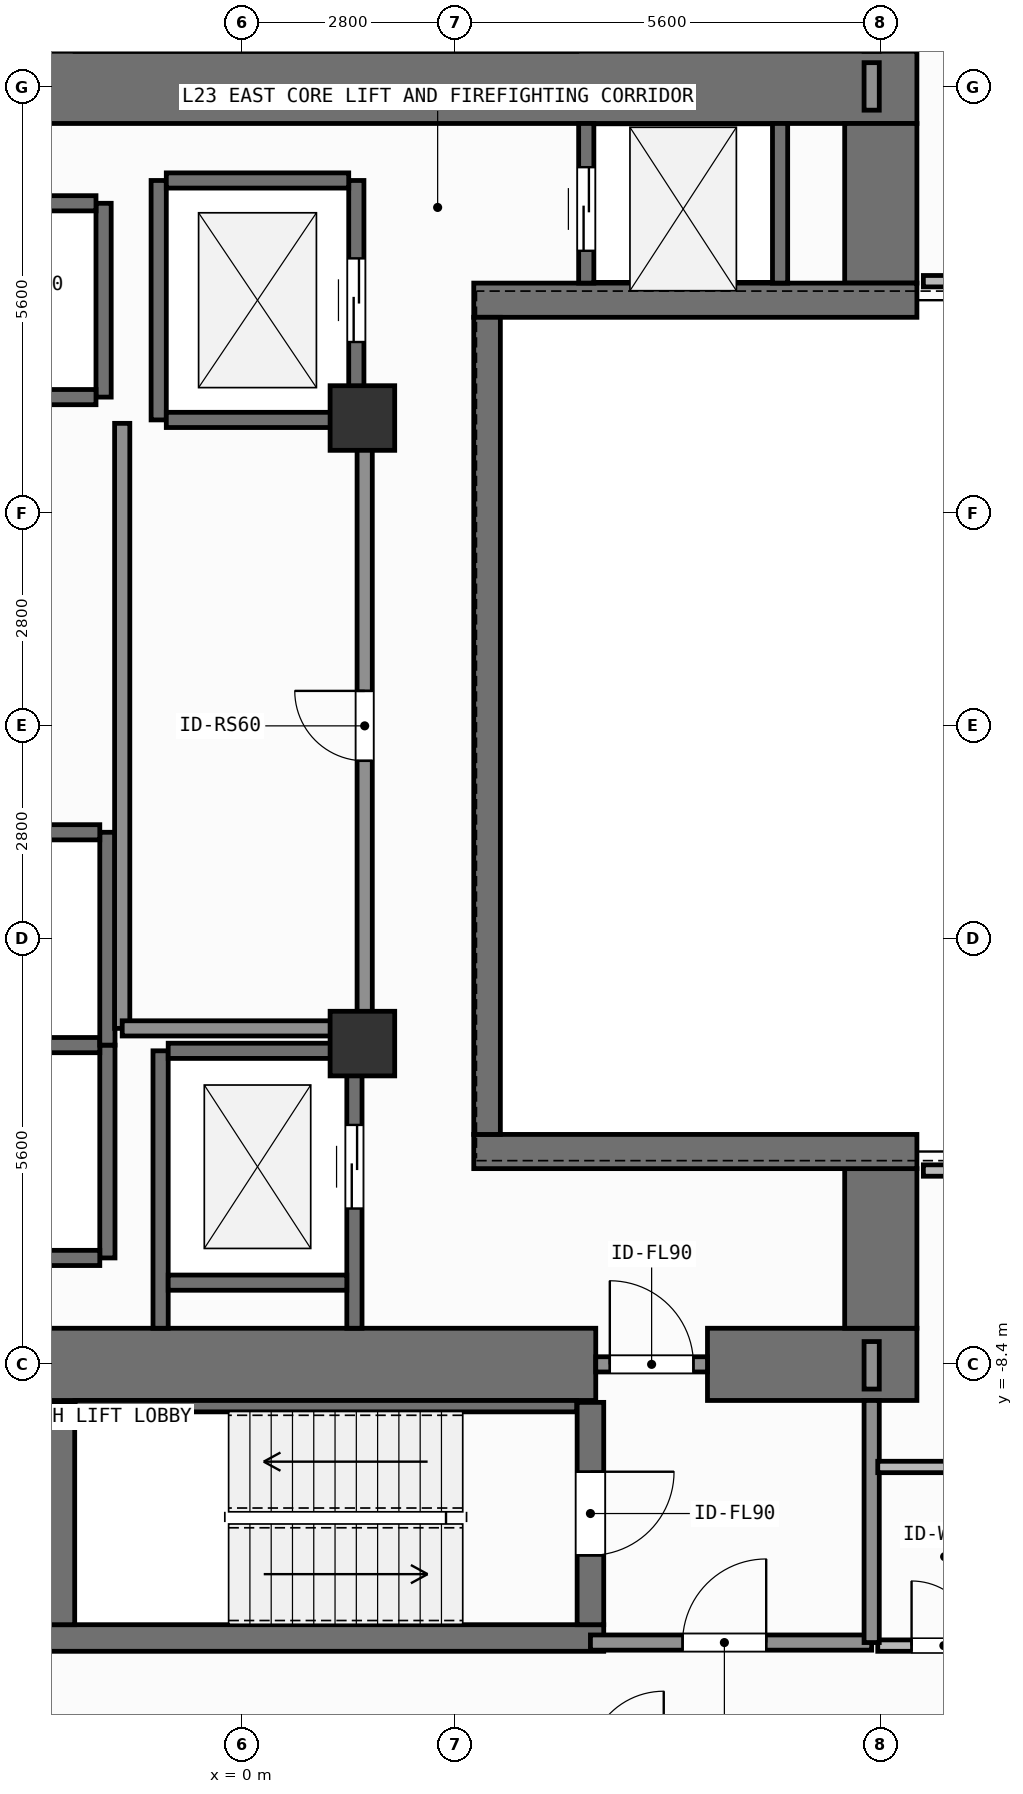
"""IFC4 building model, lengths in metres.
Left out: names, types, materials, properties, quantities, classifications, styles, units other than length and angle.
Written with IfcOpenShell. Run it as: python <this file> out.ifc"""

import sys

from ifc_helpers import new_model, si_unit, direction, frame, frame_2d, origin, origin_2d, place, context, subcontext, project, spatial, rectangle, extrude, element, fill, save


model = new_model("IFC4")
c1 = context("Model", 3, precision=1e-05, world=origin(), true_north=direction((0.0, 1.0)))
c2 = subcontext(c1, "Body", "Model", "MODEL_VIEW")
j1 = project(units=[si_unit("LENGTHUNIT", "METRE"), si_unit("PLANEANGLEUNIT", "RADIAN")], contexts=[c1])
p1 = place(None, origin())
s1 = spatial("IfcSite", under=j1, at=p1, CompositionType="ELEMENT")
p2 = place(p1, origin())
s2 = spatial("IfcBuilding", under=s1, at=p2, CompositionType="ELEMENT")
p3 = place(p2, frame((0.0, 0.0, 93.0)))
s3 = spatial("IfcBuildingStorey", under=s2, at=p3, CompositionType="ELEMENT", Elevation=93.0)
p4 = place(p3, frame((-2.62, -8.4, 0.0), z_axis=(0.0, 0.0, 1.0), x_axis=(1.0, 0.0, 0.0)))
e1 = element("IfcWall", 1, at=p4, inside=s3, PredefinedType="SHEAR", context=c2, shape_type="SweptSolid", body=[
    extrude(rectangle(XDim=7.27, YDim=0.95, at=frame_2d((3.635, 0.0))), origin(), (0.0, 0.0, 1.0), 3.9),
])
p5 = place(p3, frame((6.12, -8.4, 0.0), z_axis=(0.0, 0.0, 1.0), x_axis=(1.0, 0.0, 0.0)))
e2 = element("IfcWall", 2, at=p5, inside=s3, PredefinedType="SHEAR", context=c2, shape_type="SweptSolid", body=[
    extrude(rectangle(XDim=2.755, YDim=0.95, at=frame_2d((1.377, 0.0))), origin(), (0.0, 0.0, 1.0), 3.9),
])
p6 = place(p3, frame((-7.55, 8.4, 0.0), z_axis=(0.0, 0.0, 1.0), x_axis=(1.0, 0.0, 0.0)))
e3 = element("IfcWall", 3, at=p6, inside=s3, PredefinedType="SHEAR", context=c2, shape_type="SweptSolid", body=[
    extrude(rectangle(XDim=16.425, YDim=0.95, at=frame_2d((8.212, 0.0))), origin(), (0.0, 0.0, 1.0), 3.9),
])
for number, where, z_axis, x_axis in (
    (4, (8.4, -7.925, 0.0), (0.0, 0.0, 1.0), (0.0, 1.0, 0.0)),
    (5, (8.4, 5.825, 0.0), (0.0, 0.0, 1.0), (0.0, 1.0, 0.0)),
):
    element("IfcWall", number, at=place(p3, frame(where, z_axis=z_axis, x_axis=x_axis)), inside=s3, PredefinedType="SHEAR", context=c2, shape_type="SweptSolid", body=[
        extrude(rectangle(XDim=2.1, YDim=0.95, at=frame_2d((1.05, 0.0))), origin(), (0.0, 0.0, 1.0), 3.9),
    ])
for number, where, z_axis, x_axis in (
    (6, (3.045, -5.6, 0.0), (0.0, 0.0, 1.0), (1.0, 0.0, 0.0)),
    (7, (3.045, 5.6, 0.0), (0.0, 0.0, 1.0), (1.0, 0.0, 0.0)),
):
    element("IfcWall", number, at=place(p3, frame(where, z_axis=z_axis, x_axis=x_axis)), inside=s3, PredefinedType="SHEAR", context=c2, shape_type="SweptSolid", body=[
        extrude(rectangle(XDim=5.83, YDim=0.45, at=frame_2d((2.915, 0.0))), origin(), (0.0, 0.0, 1.0), 3.9),
    ])
p7 = place(p3, frame((3.22, -5.375, 0.0), z_axis=(0.0, 0.0, 1.0), x_axis=(0.0, 1.0, 0.0)))
e8 = element("IfcWall", 8, at=p7, inside=s3, PredefinedType="SHEAR", context=c2, shape_type="SweptSolid", body=[
    extrude(rectangle(XDim=10.75, YDim=0.35, at=frame_2d((5.375, 0.0))), origin(), (0.0, 0.0, 1.0), 3.9),
])
p8 = place(p3, frame((-2.555, -12.0, 0.0), z_axis=(0.0, 0.0, 1.0), x_axis=(1.0, 0.0, 0.0)))
e9 = element("IfcWall", 9, at=p8, inside=s3, PredefinedType="SHEAR", context=c2, shape_type="SweptSolid", body=[
    extrude(rectangle(XDim=7.31, YDim=0.35, at=frame_2d((3.655, 0.0))), origin(), (0.0, 0.0, 1.0), 3.9),
])
p9 = place(p3, frame((-2.2, -8.95, 0.0), z_axis=(0.0, 0.0, 1.0), x_axis=(1.0, 0.0, 0.0)))
e10 = element("IfcWall", 10, at=p9, inside=s3, PredefinedType="SHEAR", context=c2, shape_type="SweptSolid", body=[
    extrude(rectangle(XDim=6.6, YDim=0.15, at=frame_2d((3.3, 0.0))), origin(), (0.0, 0.0, 1.0), 3.9),
])
p10 = place(p3, frame((-2.38, -11.825, 0.0), z_axis=(0.0, 0.0, 1.0), x_axis=(0.0, 1.0, 0.0)))
e11 = element("IfcWall", 11, at=p10, inside=s3, PredefinedType="SHEAR", context=c2, shape_type="SweptSolid", body=[
    extrude(rectangle(XDim=2.925, YDim=0.35, at=frame_2d((1.462, 0.0))), origin(), (0.0, 0.0, 1.0), 3.9),
])
p11 = place(p3, frame((4.58, -8.9, 0.0), z_axis=(0.0, 0.0, 1.0), x_axis=(0.0, -1.0, 0.0)))
e12 = element("IfcWall", 12, at=p11, inside=s3, PredefinedType="SHEAR", context=c2, shape_type="SweptSolid", body=[
    extrude(rectangle(XDim=2.925, YDim=0.35, at=frame_2d((1.462, 0.0))), origin(), (0.0, 0.0, 1.0), 3.9),
])
p12 = place(p11, frame((0.913, 0.0, 0.0)))
e13 = element("IfcOpeningElement", 13, at=p12, cuts=e12, PredefinedType="OPENING", context=c2, shape_type="SweptSolid", body=[
    extrude(rectangle(XDim=1.1, YDim=2.15, at=frame_2d((0.55, 1.075))), frame((0.0, 0.185, 0.0), z_axis=(0.0, -1.0, 0.0), x_axis=(1.0, 0.0, 0.0)), (0.0, 0.0, 1.0), 0.37),
])
for number, where, z_axis, x_axis in (
    (14, (1.58, -4.18, 0.0), (0.0, 0.0, 1.0), (1.0, 0.0, 0.0)),
    (15, (1.58, 4.05, 0.0), (0.0, 0.0, 1.0), (1.0, 0.0, 0.0)),
):
    element("IfcColumn", number, at=place(p3, frame(where, z_axis=z_axis, x_axis=x_axis)), inside=s3, PredefinedType="COLUMN", context=c2, shape_type="SweptSolid", body=[
        extrude(rectangle(XDim=0.85, YDim=0.85, at=origin_2d()), origin(), (0.0, 0.0, 1.0), 3.9),
    ])
p13 = place(p3, frame((-1.825, 4.325, 0.0), z_axis=(0.0, 0.0, 1.0), x_axis=(0.0, 1.0, 0.0)))
e16 = element("IfcWall", 16, at=p13, inside=s3, PredefinedType="SHEAR", context=c2, shape_type="SweptSolid", body=[
    extrude(rectangle(XDim=2.55, YDim=0.2, at=frame_2d((1.275, 0.0))), origin(), (0.0, 0.0, 1.0), 3.68),
])
for number, where, z_axis, x_axis in (
    (17, (-4.275, 4.325, 0.0), (0.0, 0.0, 1.0), (1.0, 0.0, 0.0)),
    (18, (-4.275, 6.875, 0.0), (0.0, 0.0, 1.0), (1.0, 0.0, 0.0)),
):
    element("IfcWall", number, at=place(p3, frame(where, z_axis=z_axis, x_axis=x_axis)), inside=s3, PredefinedType="SHEAR", context=c2, shape_type="SweptSolid", body=[
        extrude(rectangle(XDim=2.35, YDim=0.2, at=frame_2d((1.175, 0.0))), origin(), (0.0, 0.0, 1.0), 3.68),
    ])
p14 = place(p3, frame((-1.775, -7.0, 0.0), z_axis=(0.0, 0.0, 1.0), x_axis=(0.0, 1.0, 0.0)))
e19 = element("IfcWall", 19, at=p14, inside=s3, PredefinedType="SHEAR", context=c2, shape_type="SweptSolid", body=[
    extrude(rectangle(XDim=2.8, YDim=0.2, at=frame_2d((1.4, 0.0))), origin(), (0.0, 0.0, 1.0), 3.68),
])
for number, where, z_axis, x_axis in (
    (20, (-4.325, -7.0, 0.0), (0.0, 0.0, 1.0), (1.0, 0.0, 0.0)),
    (21, (-4.325, -4.2, 0.0), (0.0, 0.0, 1.0), (1.0, 0.0, 0.0)),
):
    element("IfcWall", number, at=place(p3, frame(where, z_axis=z_axis, x_axis=x_axis)), inside=s3, PredefinedType="SHEAR", context=c2, shape_type="SweptSolid", body=[
        extrude(rectangle(XDim=2.45, YDim=0.2, at=frame_2d((1.225, 0.0))), origin(), (0.0, 0.0, 1.0), 3.68),
    ])
p15 = place(p3, frame((-1.775, -4.2, 0.0), z_axis=(0.0, 0.0, 1.0), x_axis=(0.0, 1.0, 0.0)))
e22 = element("IfcWall", 22, at=p15, inside=s3, PredefinedType="SHEAR", context=c2, shape_type="SweptSolid", body=[
    extrude(rectangle(XDim=2.8, YDim=0.2, at=frame_2d((1.4, 0.0))), origin(), (0.0, 0.0, 1.0), 3.68),
])
p16 = place(p3, frame((-4.325, -1.4, 0.0), z_axis=(0.0, 0.0, 1.0), x_axis=(1.0, 0.0, 0.0)))
e23 = element("IfcWall", 23, at=p16, inside=s3, PredefinedType="SHEAR", context=c2, shape_type="SweptSolid", body=[
    extrude(rectangle(XDim=2.45, YDim=0.2, at=frame_2d((1.225, 0.0))), origin(), (0.0, 0.0, 1.0), 3.68),
])
p17 = place(p3, frame((-1.1, 4.025, 0.0), z_axis=(0.0, 0.0, 1.0), x_axis=(0.0, 1.0, 0.0)))
e24 = element("IfcWall", 24, at=p17, inside=s3, PredefinedType="SHEAR", context=c2, shape_type="SweptSolid", body=[
    extrude(rectangle(XDim=3.15, YDim=0.2, at=frame_2d((1.575, 0.0))), origin(), (0.0, 0.0, 1.0), 3.68),
])
p18 = place(p3, frame((1.5, 4.025, 0.0), z_axis=(0.0, 0.0, 1.0), x_axis=(0.0, 1.0, 0.0)))
e25 = element("IfcWall", 25, at=p18, inside=s3, PredefinedType="SHEAR", context=c2, shape_type="SweptSolid", body=[
    extrude(rectangle(XDim=3.15, YDim=0.2, at=frame_2d((1.575, 0.0))), origin(), (0.0, 0.0, 1.0), 3.68),
])
p19 = place(p18, frame((1.025, 0.0, 0.0)))
e26 = element("IfcOpeningElement", 26, at=p19, cuts=e25, PredefinedType="OPENING", context=c2, shape_type="SweptSolid", body=[
    extrude(rectangle(XDim=1.1, YDim=2.2, at=frame_2d((0.55, 1.1))), frame((0.0, 0.11, 0.0), z_axis=(0.0, -1.0, 0.0), x_axis=(1.0, 0.0, 0.0)), (0.0, 0.0, 1.0), 0.22),
])
for number, where, z_axis, x_axis in (
    (27, (-1.0, 4.025, 0.0), (0.0, 0.0, 1.0), (1.0, 0.0, 0.0)),
    (28, (-1.0, 7.175, 0.0), (0.0, 0.0, 1.0), (1.0, 0.0, 0.0)),
):
    element("IfcWall", number, at=place(p3, frame(where, z_axis=z_axis, x_axis=x_axis)), inside=s3, PredefinedType="SHEAR", context=c2, shape_type="SweptSolid", body=[
        extrude(rectangle(XDim=2.4, YDim=0.2, at=frame_2d((1.2, 0.0))), origin(), (0.0, 0.0, 1.0), 3.68),
    ])
p20 = place(p3, frame((-1.075, -7.925, 0.0), z_axis=(0.0, 0.0, 1.0), x_axis=(0.0, 1.0, 0.0)))
e29 = element("IfcWall", 29, at=p20, inside=s3, PredefinedType="SHEAR", context=c2, shape_type="SweptSolid", body=[
    extrude(rectangle(XDim=3.65, YDim=0.2, at=frame_2d((1.825, 0.0))), origin(), (0.0, 0.0, 1.0), 3.68),
])
p21 = place(p3, frame((1.475, -7.925, 0.0), z_axis=(0.0, 0.0, 1.0), x_axis=(0.0, 1.0, 0.0)))
e30 = element("IfcWall", 30, at=p21, inside=s3, PredefinedType="SHEAR", context=c2, shape_type="SweptSolid", body=[
    extrude(rectangle(XDim=3.65, YDim=0.2, at=frame_2d((1.825, 0.0))), origin(), (0.0, 0.0, 1.0), 3.68),
])
p22 = place(p21, frame((1.575, 0.0, 0.0)))
e31 = element("IfcOpeningElement", 31, at=p22, cuts=e30, PredefinedType="OPENING", context=c2, shape_type="SweptSolid", body=[
    extrude(rectangle(XDim=1.1, YDim=2.2, at=frame_2d((0.55, 1.1))), frame((0.0, 0.11, 0.0), z_axis=(0.0, -1.0, 0.0), x_axis=(1.0, 0.0, 0.0)), (0.0, 0.0, 1.0), 0.22),
])
for number, where, z_axis, x_axis in (
    (32, (-0.975, -7.325, 0.0), (0.0, 0.0, 1.0), (1.0, 0.0, 0.0)),
    (33, (-0.975, -4.275, 0.0), (0.0, 0.0, 1.0), (1.0, 0.0, 0.0)),
):
    element("IfcWall", number, at=place(p3, frame(where, z_axis=z_axis, x_axis=x_axis)), inside=s3, PredefinedType="SHEAR", context=c2, shape_type="SweptSolid", body=[
        extrude(rectangle(XDim=2.35, YDim=0.2, at=frame_2d((1.175, 0.0))), origin(), (0.0, 0.0, 1.0), 3.68),
    ])
p23 = place(p3, frame((4.525, 5.825, 0.0), z_axis=(0.0, 0.0, 1.0), x_axis=(0.0, 1.0, 0.0)))
e34 = element("IfcWall", 34, at=p23, inside=s3, PredefinedType="SHEAR", context=c2, shape_type="SweptSolid", body=[
    extrude(rectangle(XDim=2.1, YDim=0.2, at=frame_2d((1.05, 0.0))), origin(), (0.0, 0.0, 1.0), 3.68),
])
p24 = place(p23, frame((0.425, 0.0, 0.0)))
e35 = element("IfcOpeningElement", 35, at=p24, cuts=e34, PredefinedType="OPENING", context=c2, shape_type="SweptSolid", body=[
    extrude(rectangle(XDim=1.1, YDim=2.2, at=frame_2d((0.55, 1.1))), frame((0.0, 0.11, 0.0), z_axis=(0.0, -1.0, 0.0), x_axis=(1.0, 0.0, 0.0)), (0.0, 0.0, 1.0), 0.22),
])
p25 = place(p3, frame((7.075, 5.825, 0.0), z_axis=(0.0, 0.0, 1.0), x_axis=(0.0, 1.0, 0.0)))
e36 = element("IfcWall", 36, at=p25, inside=s3, PredefinedType="SHEAR", context=c2, shape_type="SweptSolid", body=[
    extrude(rectangle(XDim=2.1, YDim=0.2, at=frame_2d((1.05, 0.0))), origin(), (0.0, 0.0, 1.0), 3.68),
])
p26 = place(p3, frame((4.58, -12.06, 0.0), z_axis=(0.0, 0.0, 1.0), x_axis=(1.0, 0.0, 0.0)))
e37 = element("IfcWall", 37, at=p26, inside=s3, PredefinedType="SOLIDWALL", context=c2, shape_type="SweptSolid", body=[
    extrude(rectangle(XDim=3.7, YDim=0.2, at=frame_2d((1.85, 0.0))), origin(), (0.0, 0.0, 1.0), 3.68),
])
p27 = place(p26, frame((1.212, 0.0, 0.0)))
e38 = element("IfcOpeningElement", 38, at=p27, cuts=e37, PredefinedType="OPENING", context=c2, shape_type="SweptSolid", body=[
    extrude(rectangle(XDim=1.1, YDim=2.15, at=frame_2d((0.55, 1.075))), frame((0.0, 0.11, 0.0), z_axis=(0.0, -1.0, 0.0), x_axis=(1.0, 0.0, 0.0)), (0.0, 0.0, 1.0), 0.22),
])
p28 = place(p3, frame((4.65, -8.4, 0.0), z_axis=(0.0, 0.0, 1.0), x_axis=(1.0, 0.0, 0.0)))
e39 = element("IfcWall", 39, at=p28, inside=s3, PredefinedType="SOLIDWALL", context=c2, shape_type="SweptSolid", body=[
    extrude(rectangle(XDim=1.47, YDim=0.2, at=frame_2d((0.735, 0.0))), origin(), (0.0, 0.0, 1.0), 2.72),
])
p29 = place(p28, frame((0.185, 0.0, 0.0)))
e40 = element("IfcOpeningElement", 40, at=p29, cuts=e39, PredefinedType="OPENING", context=c2, shape_type="SweptSolid", body=[
    extrude(rectangle(XDim=1.1, YDim=2.15, at=frame_2d((0.55, 1.075))), frame((0.0, 0.11, 0.0), z_axis=(0.0, -1.0, 0.0), x_axis=(1.0, 0.0, 0.0)), (0.0, 0.0, 1.0), 0.22),
])
p30 = place(p3, frame((1.61, -3.98, 0.0), z_axis=(0.0, 0.0, 1.0), x_axis=(0.0, 1.0, 0.0)))
e41 = element("IfcWall", 41, at=p30, inside=s3, PredefinedType="SOLIDWALL", context=c2, shape_type="SweptSolid", body=[
    extrude(rectangle(XDim=7.96, YDim=0.2, at=frame_2d((3.98, 0.0))), origin(), (0.0, 0.0, 1.0), 3.68),
])
p31 = place(p30, frame((3.52, 0.0, 0.0)))
e42 = element("IfcOpeningElement", 42, at=p31, cuts=e41, PredefinedType="OPENING", context=c2, shape_type="SweptSolid", body=[
    extrude(rectangle(XDim=0.92, YDim=2.1, at=frame_2d((0.46, 1.05))), frame((0.0, 0.11, 0.0), z_axis=(0.0, -1.0, 0.0), x_axis=(1.0, 0.0, 0.0)), (0.0, 0.0, 1.0), 0.22),
])
p32 = place(p3, frame((8.36, -12.1, 0.0), z_axis=(0.0, 0.0, 1.0), x_axis=(1.0, 0.0, 0.0)))
e43 = element("IfcWall", 43, at=p32, inside=s3, PredefinedType="PARTITIONING", context=c2, shape_type="SweptSolid", body=[
    extrude(rectangle(XDim=1.74, YDim=0.15, at=frame_2d((0.87, 0.0))), origin(), (0.0, 0.0, 1.0), 3.68),
])
p33 = place(p32, frame((0.445, 0.0, 0.0)))
e44 = element("IfcOpeningElement", 44, at=p33, cuts=e43, PredefinedType="OPENING", context=c2, shape_type="SweptSolid", body=[
    extrude(rectangle(XDim=0.85, YDim=2.1, at=frame_2d((0.425, 1.05))), frame((0.0, 0.085, 0.0), z_axis=(0.0, -1.0, 0.0), x_axis=(1.0, 0.0, 0.0)), (0.0, 0.0, 1.0), 0.17),
])
p34 = place(p3, frame((8.28, -12.06, 0.0), z_axis=(0.0, 0.0, 1.0), x_axis=(0.0, 1.0, 0.0)))
e45 = element("IfcWall", 45, at=p34, inside=s3, PredefinedType="SOLIDWALL", context=c2, shape_type="SweptSolid", body=[
    extrude(rectangle(XDim=3.185, YDim=0.2, at=frame_2d((1.593, 0.0))), origin(), (0.0, 0.0, 1.0), 3.68),
])
p35 = place(p3, frame((-1.58, -3.98, 0.0), z_axis=(0.0, 0.0, 1.0), x_axis=(0.0, 1.0, 0.0)))
e46 = element("IfcWall", 46, at=p35, inside=s3, PredefinedType="SOLIDWALL", context=c2, shape_type="SweptSolid", body=[
    extrude(rectangle(XDim=7.96, YDim=0.2, at=frame_2d((3.98, 0.0))), origin(), (0.0, 0.0, 1.0), 3.68),
])
p36 = place(p3, frame((-1.58, -3.98, 0.0), z_axis=(0.0, 0.0, 1.0), x_axis=(1.0, 0.0, 0.0)))
e47 = element("IfcWall", 47, at=p36, inside=s3, PredefinedType="SOLIDWALL", context=c2, shape_type="SweptSolid", body=[
    extrude(rectangle(XDim=3.19, YDim=0.2, at=frame_2d((1.595, 0.0))), origin(), (0.0, 0.0, 1.0), 3.68),
])
p37 = place(p3, frame((8.28, -8.725, 0.0), z_axis=(0.0, 0.0, 1.0), x_axis=(0.0, 1.0, 0.0)))
e48 = element("IfcWall", 48, at=p37, inside=s3, PredefinedType="SOLIDWALL", context=c2, shape_type="SweptSolid", body=[
    extrude(rectangle(XDim=0.625, YDim=0.2, at=frame_2d((0.312, 0.0))), origin(), (0.0, 0.0, 1.0), 3.68),
])
p38 = place(p3, frame((8.36, -9.75, 0.0), z_axis=(0.0, 0.0, 1.0), x_axis=(1.0, 0.0, 0.0)))
e49 = element("IfcWall", 49, at=p38, inside=s3, PredefinedType="PARTITIONING", context=c2, shape_type="SweptSolid", body=[
    extrude(rectangle(XDim=1.74, YDim=0.15, at=frame_2d((0.87, 0.0))), origin(), (0.0, 0.0, 1.0), 3.68),
])
p39 = place(p3, frame((8.96, -5.85, 0.0), z_axis=(0.0, 0.0, 1.0), x_axis=(1.0, 0.0, 0.0)))
e50 = element("IfcWall", 50, at=p39, inside=s3, PredefinedType="PARTITIONING", context=c2, shape_type="SweptSolid", body=[
    extrude(rectangle(XDim=6.62, YDim=0.15, at=frame_2d((3.31, 0.0))), origin(), (0.0, 0.0, 1.0), 3.68),
])
p40 = place(p3, frame((8.28, 8.1, 0.0), z_axis=(0.0, 0.0, 1.0), x_axis=(0.0, 1.0, 0.0)))
e51 = element("IfcWall", 51, at=p40, inside=s3, PredefinedType="SOLIDWALL", context=c2, shape_type="SweptSolid", body=[
    extrude(rectangle(XDim=0.625, YDim=0.2, at=frame_2d((0.312, 0.0))), origin(), (0.0, 0.0, 1.0), 3.68),
])
p41 = place(p3, frame((8.96, 5.85, 0.0), z_axis=(0.0, 0.0, 1.0), x_axis=(1.0, 0.0, 0.0)))
e52 = element("IfcWall", 52, at=p41, inside=s3, PredefinedType="PARTITIONING", context=c2, shape_type="SweptSolid", body=[
    extrude(rectangle(XDim=6.62, YDim=0.15, at=frame_2d((3.31, 0.0))), origin(), (0.0, 0.0, 1.0), 3.68),
])
p42 = place(p19, origin())
e53 = element("IfcDoor", 53, at=p42, inside=s3, OperationType="SLIDING_TO_LEFT", PredefinedType="DOOR", context=c2, shape_type="SweptSolid", body=[
    extrude(rectangle(XDim=1.1, YDim=2.2, at=frame_2d((0.55, 1.1))), frame((0.0, 0.025, 0.0), z_axis=(0.0, -1.0, 0.0), x_axis=(1.0, 0.0, 0.0)), (0.0, 0.0, 1.0), 0.05),
])
fill(e26, e53)
p43 = place(p22, origin())
e54 = element("IfcDoor", 54, at=p43, inside=s3, OperationType="SLIDING_TO_LEFT", PredefinedType="DOOR", context=c2, shape_type="SweptSolid", body=[
    extrude(rectangle(XDim=1.1, YDim=2.2, at=frame_2d((0.55, 1.1))), frame((0.0, 0.025, 0.0), z_axis=(0.0, -1.0, 0.0), x_axis=(1.0, 0.0, 0.0)), (0.0, 0.0, 1.0), 0.05),
])
fill(e31, e54)
p44 = place(p24, origin())
e55 = element("IfcDoor", 55, at=p44, inside=s3, OperationType="SLIDING_TO_LEFT", PredefinedType="DOOR", context=c2, shape_type="SweptSolid", body=[
    extrude(rectangle(XDim=1.1, YDim=2.2, at=frame_2d((0.55, 1.1))), frame((0.0, 0.025, 0.0), z_axis=(0.0, -1.0, 0.0), x_axis=(1.0, 0.0, 0.0)), (0.0, 0.0, 1.0), 0.05),
])
fill(e35, e55)
p45 = place(p12, origin())
e56 = element("IfcDoor", 56, at=p45, inside=s3, OperationType="SINGLE_SWING_LEFT", PredefinedType="DOOR", context=c2, shape_type="SweptSolid", body=[
    extrude(rectangle(XDim=1.1, YDim=2.15, at=frame_2d((0.55, 1.075))), frame((0.0, 0.025, 0.0), z_axis=(0.0, -1.0, 0.0), x_axis=(1.0, 0.0, 0.0)), (0.0, 0.0, 1.0), 0.05),
])
fill(e13, e56)
p46 = place(p27, origin())
e57 = element("IfcDoor", 57, at=p46, inside=s3, OperationType="SINGLE_SWING_RIGHT", PredefinedType="DOOR", context=c2, shape_type="SweptSolid", body=[
    extrude(rectangle(XDim=1.1, YDim=2.15, at=frame_2d((0.55, 1.075))), frame((0.0, 0.025, 0.0), z_axis=(0.0, -1.0, 0.0), x_axis=(1.0, 0.0, 0.0)), (0.0, 0.0, 1.0), 0.05),
])
fill(e38, e57)
p47 = place(p29, origin())
e58 = element("IfcDoor", 58, at=p47, inside=s3, OperationType="SINGLE_SWING_LEFT", PredefinedType="DOOR", context=c2, shape_type="SweptSolid", body=[
    extrude(rectangle(XDim=1.1, YDim=2.15, at=frame_2d((0.55, 1.075))), frame((0.0, 0.025, 0.0), z_axis=(0.0, -1.0, 0.0), x_axis=(1.0, 0.0, 0.0)), (0.0, 0.0, 1.0), 0.05),
])
fill(e40, e58)
p48 = place(p31, origin())
e59 = element("IfcDoor", 59, at=p48, inside=s3, OperationType="SINGLE_SWING_RIGHT", PredefinedType="DOOR", context=c2, shape_type="SweptSolid", body=[
    extrude(rectangle(XDim=0.92, YDim=2.1, at=frame_2d((0.46, 1.05))), frame((0.0, 0.025, 0.0), z_axis=(0.0, -1.0, 0.0), x_axis=(1.0, 0.0, 0.0)), (0.0, 0.0, 1.0), 0.05),
])
fill(e42, e59)
p49 = place(p33, origin())
e60 = element("IfcDoor", 60, at=p49, inside=s3, OperationType="SINGLE_SWING_LEFT", PredefinedType="DOOR", context=c2, shape_type="SweptSolid", body=[
    extrude(rectangle(XDim=0.85, YDim=2.1, at=frame_2d((0.425, 1.05))), frame((0.0, 0.025, 0.0), z_axis=(0.0, -1.0, 0.0), x_axis=(1.0, 0.0, 0.0)), (0.0, 0.0, 1.0), 0.05),
])
fill(e44, e60)
save(model, sys.argv[1])
